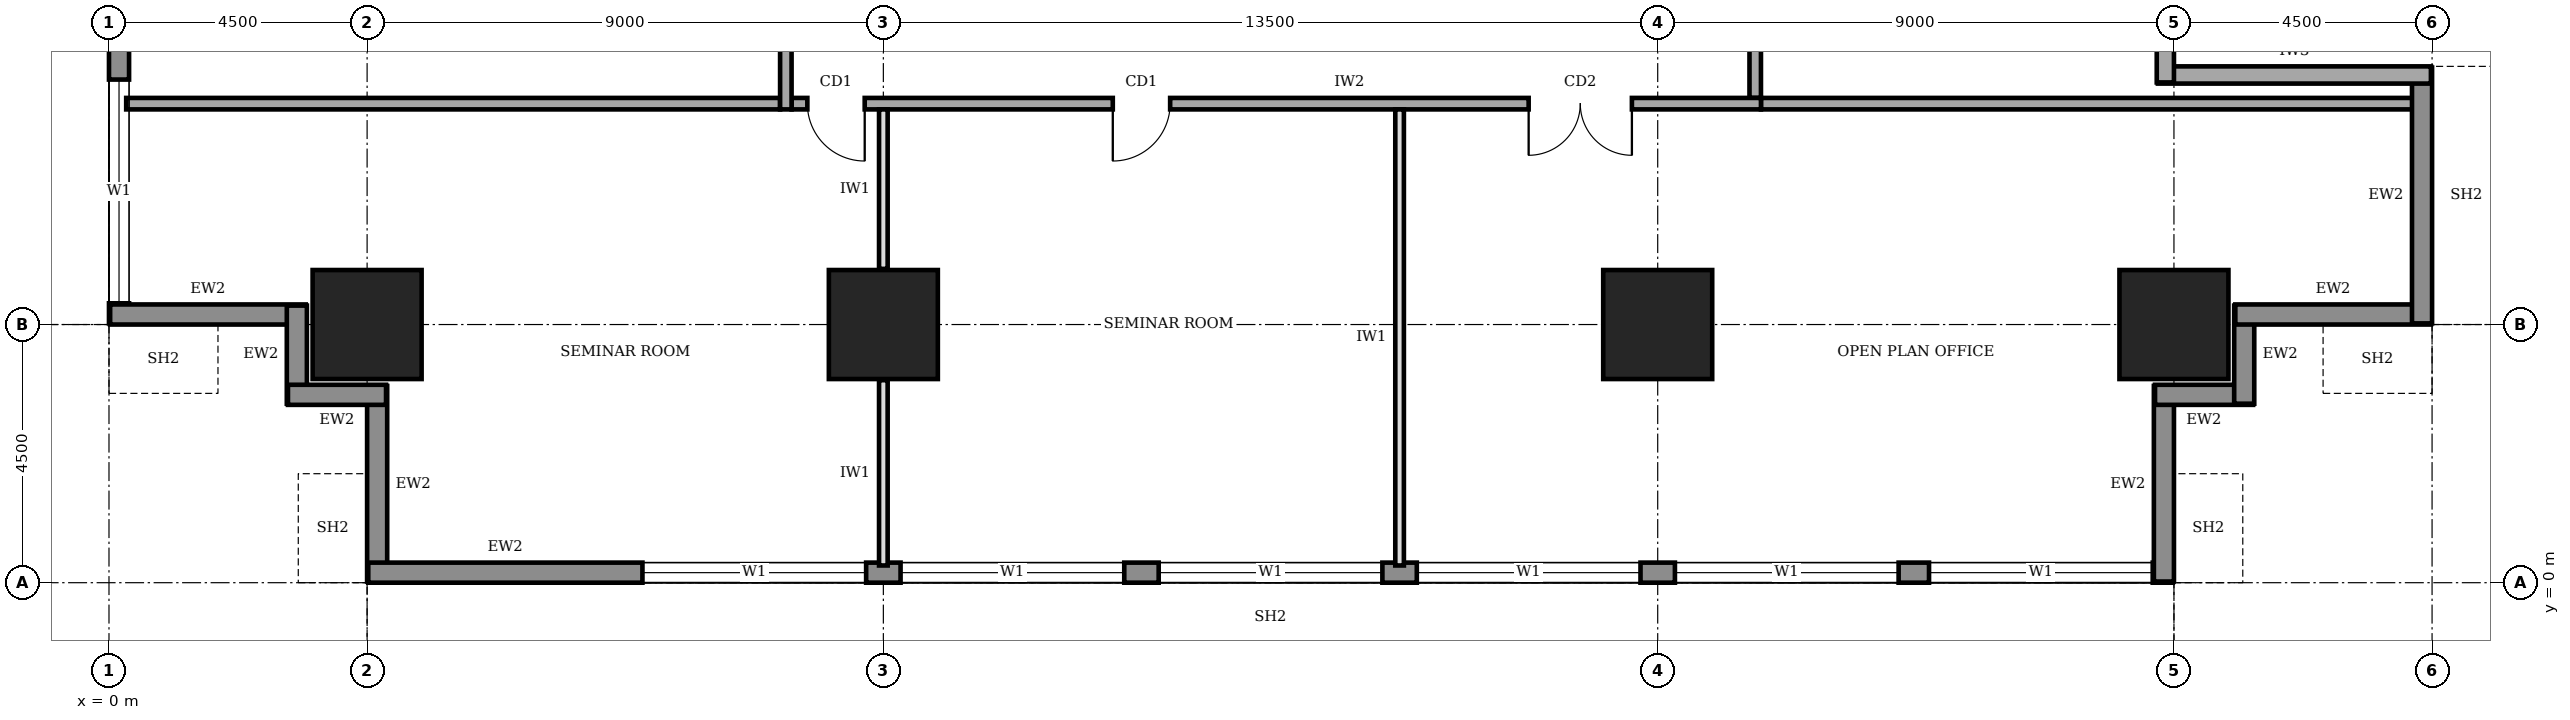
"""IFC4 building model, lengths in metres.
Left out: names, types, materials, properties, quantities, classifications, styles, units other than length and angle.
Written with IfcOpenShell. Run it as: python <this file> out.ifc"""

import sys

from ifc_helpers import new_model, si_unit, direction, frame, frame_2d, origin, origin_2d, place, context, subcontext, project, spatial, rectangle, extrude, element, fill, save


model = new_model("IFC4")
c1 = context("Model", 3, precision=1e-05, world=origin(), true_north=direction((0.0, 1.0)))
c2 = subcontext(c1, "Body", "Model", "MODEL_VIEW")
j1 = project(units=[si_unit("LENGTHUNIT", "METRE"), si_unit("PLANEANGLEUNIT", "RADIAN")], contexts=[c1])
p1 = place(None, origin())
s1 = spatial("IfcSite", under=j1, at=p1, CompositionType="ELEMENT")
p2 = place(p1, origin())
s2 = spatial("IfcBuilding", under=s1, at=p2, CompositionType="ELEMENT")
p3 = place(p2, frame((0.0, 0.0, 109.0)))
s3 = spatial("IfcBuildingStorey", under=s2, at=p3, CompositionType="ELEMENT", Elevation=109.0)
for number, where, z_axis, x_axis in (
    (1, (4.5, 4.5, 0.0), (0.0, 0.0, 1.0), (1.0, 0.0, 0.0)),
    (2, (13.5, 4.5, 0.0), (0.0, 0.0, 1.0), (1.0, 0.0, 0.0)),
    (3, (27.0, 4.5, 0.0), (0.0, 0.0, 1.0), (1.0, 0.0, 0.0)),
    (4, (36.0, 4.5, 0.0), (0.0, 0.0, 1.0), (1.0, 0.0, 0.0)),
):
    element("IfcColumn", number, at=place(p3, frame(where, z_axis=z_axis, x_axis=x_axis)), inside=s3, PredefinedType="COLUMN", context=c2, shape_type="SweptSolid", body=[
        extrude(rectangle(XDim=1.9, YDim=1.9, at=origin_2d()), origin(), (0.0, 0.0, 1.0), 4.0),
    ])
p4 = place(p3, frame((4.675, 3.43, 0.0), z_axis=(0.0, 0.0, 1.0), x_axis=(0.0, -1.0, 0.0)))
e5 = element("IfcWall", 5, at=p4, inside=s3, PredefinedType="STANDARD", context=c2, shape_type="SweptSolid", body=[
    extrude(rectangle(XDim=3.41, YDim=0.35, at=frame_2d((1.705, 0.0))), origin(), (0.0, 0.0, 1.0), 2.85),
])
p5 = place(p3, frame((4.52, 0.175, 0.0), z_axis=(0.0, 0.0, 1.0), x_axis=(1.0, 0.0, 0.0)))
e6 = element("IfcWall", 6, at=p5, inside=s3, PredefinedType="STANDARD", context=c2, shape_type="SweptSolid", body=[
    extrude(rectangle(XDim=31.46, YDim=0.35, at=frame_2d((15.73, 0.0))), origin(), (0.0, 0.0, 1.0), 3.75),
])
p6 = place(p5, frame((4.78, 0.0, 0.9)))
e7 = element("IfcOpeningElement", 7, at=p6, cuts=e6, PredefinedType="OPENING", context=c2, shape_type="SweptSolid", body=[
    extrude(rectangle(XDim=3.9, YDim=2.2, at=frame_2d((1.95, 1.1))), frame((0.0, 0.185, 0.0), z_axis=(0.0, -1.0, 0.0), x_axis=(1.0, 0.0, 0.0)), (0.0, 0.0, 1.0), 0.37),
])
p7 = place(p5, frame((9.28, 0.0, 0.9)))
e8 = element("IfcOpeningElement", 8, at=p7, cuts=e6, PredefinedType="OPENING", context=c2, shape_type="SweptSolid", body=[
    extrude(rectangle(XDim=3.9, YDim=2.2, at=frame_2d((1.95, 1.1))), frame((0.0, 0.185, 0.0), z_axis=(0.0, -1.0, 0.0), x_axis=(1.0, 0.0, 0.0)), (0.0, 0.0, 1.0), 0.37),
])
p8 = place(p5, frame((13.78, 0.0, 0.9)))
e9 = element("IfcOpeningElement", 9, at=p8, cuts=e6, PredefinedType="OPENING", context=c2, shape_type="SweptSolid", body=[
    extrude(rectangle(XDim=3.9, YDim=2.2, at=frame_2d((1.95, 1.1))), frame((0.0, 0.185, 0.0), z_axis=(0.0, -1.0, 0.0), x_axis=(1.0, 0.0, 0.0)), (0.0, 0.0, 1.0), 0.37),
])
p9 = place(p5, frame((18.28, 0.0, 0.9)))
e10 = element("IfcOpeningElement", 10, at=p9, cuts=e6, PredefinedType="OPENING", context=c2, shape_type="SweptSolid", body=[
    extrude(rectangle(XDim=3.9, YDim=2.2, at=frame_2d((1.95, 1.1))), frame((0.0, 0.185, 0.0), z_axis=(0.0, -1.0, 0.0), x_axis=(1.0, 0.0, 0.0)), (0.0, 0.0, 1.0), 0.37),
])
p10 = place(p5, frame((22.78, 0.0, 0.9)))
e11 = element("IfcOpeningElement", 11, at=p10, cuts=e6, PredefinedType="OPENING", context=c2, shape_type="SweptSolid", body=[
    extrude(rectangle(XDim=3.9, YDim=2.2, at=frame_2d((1.95, 1.1))), frame((0.0, 0.185, 0.0), z_axis=(0.0, -1.0, 0.0), x_axis=(1.0, 0.0, 0.0)), (0.0, 0.0, 1.0), 0.37),
])
p11 = place(p5, frame((27.21, 0.0, 0.9)))
e12 = element("IfcOpeningElement", 12, at=p11, cuts=e6, PredefinedType="OPENING", context=c2, shape_type="SweptSolid", body=[
    extrude(rectangle(XDim=3.9, YDim=2.2, at=frame_2d((1.95, 1.1))), frame((0.0, 0.185, 0.0), z_axis=(0.0, -1.0, 0.0), x_axis=(1.0, 0.0, 0.0)), (0.0, 0.0, 1.0), 0.37),
])
p12 = place(p3, frame((35.825, 0.02, 0.0), z_axis=(0.0, 0.0, 1.0), x_axis=(0.0, 1.0, 0.0)))
e13 = element("IfcWall", 13, at=p12, inside=s3, PredefinedType="STANDARD", context=c2, shape_type="SweptSolid", body=[
    extrude(rectangle(XDim=3.41, YDim=0.35, at=frame_2d((1.705, 0.0))), origin(), (0.0, 0.0, 1.0), 2.85),
])
for number, where, z_axis, x_axis in (
    (14, (35.67, 3.275, 0.0), (0.0, 0.0, 1.0), (1.0, 0.0, 0.0)),
    (15, (37.225, 3.12, 0.0), (0.0, 0.0, 1.0), (0.0, 1.0, 0.0)),
):
    element("IfcWall", number, at=place(p3, frame(where, z_axis=z_axis, x_axis=x_axis)), inside=s3, PredefinedType="STANDARD", context=c2, shape_type="SweptSolid", body=[
        extrude(rectangle(XDim=1.71, YDim=0.35, at=frame_2d((0.855, 0.0))), origin(), (0.0, 0.0, 1.0), 3.75),
    ])
p13 = place(p3, frame((37.07, 4.675, 0.0), z_axis=(0.0, 0.0, 1.0), x_axis=(1.0, 0.0, 0.0)))
e16 = element("IfcWall", 16, at=p13, inside=s3, PredefinedType="STANDARD", context=c2, shape_type="SweptSolid", body=[
    extrude(rectangle(XDim=3.41, YDim=0.35, at=frame_2d((1.705, 0.0))), origin(), (0.0, 0.0, 1.0), 2.85),
])
p14 = place(p3, frame((40.325, 4.52, 0.0), z_axis=(0.0, 0.0, 1.0), x_axis=(0.0, 1.0, 0.0)))
e17 = element("IfcWall", 17, at=p14, inside=s3, PredefinedType="STANDARD", context=c2, shape_type="SweptSolid", body=[
    extrude(rectangle(XDim=4.46, YDim=0.35, at=frame_2d((2.23, 0.0))), origin(), (0.0, 0.0, 1.0), 3.75),
])
p15 = place(p3, frame((40.48, 8.85, 0.0), z_axis=(0.0, 0.0, 1.0), x_axis=(-1.0, 0.0, 0.0)))
e18 = element("IfcWall", 18, at=p15, inside=s3, PredefinedType="SOLIDWALL", context=c2, shape_type="SweptSolid", body=[
    extrude(rectangle(XDim=4.76, YDim=0.3, at=frame_2d((2.38, 0.0))), origin(), (0.0, 0.0, 1.0), 3.75),
])
p16 = place(p3, frame((35.85, 8.72, 0.0), z_axis=(0.0, 0.0, 1.0), x_axis=(0.0, 1.0, 0.0)))
e19 = element("IfcWall", 19, at=p16, inside=s3, PredefinedType="SOLIDWALL", context=c2, shape_type="SweptSolid", body=[
    extrude(rectangle(XDim=1.38, YDim=0.3, at=frame_2d((0.69, 0.0))), origin(), (0.0, 0.0, 1.0), 2.65),
])
p17 = place(p3, frame((0.175, 35.98, 0.0), z_axis=(0.0, 0.0, 1.0), x_axis=(0.0, -1.0, 0.0)))
e20 = element("IfcWall", 20, at=p17, inside=s3, PredefinedType="STANDARD", context=c2, shape_type="SweptSolid", body=[
    extrude(rectangle(XDim=31.46, YDim=0.35, at=frame_2d((15.73, 0.0))), origin(), (0.0, 0.0, 1.0), 3.75),
])
p18 = place(p17, frame((27.21, 0.0, 0.9)))
e21 = element("IfcOpeningElement", 21, at=p18, cuts=e20, PredefinedType="OPENING", context=c2, shape_type="SweptSolid", body=[
    extrude(rectangle(XDim=3.9, YDim=2.2, at=frame_2d((1.95, 1.1))), frame((0.0, 0.185, 0.0), z_axis=(0.0, -1.0, 0.0), x_axis=(1.0, 0.0, 0.0)), (0.0, 0.0, 1.0), 0.37),
])
p19 = place(p17, frame((22.78, 0.0, 0.9)))
e22 = element("IfcOpeningElement", 22, at=p19, cuts=e20, PredefinedType="OPENING", context=c2, shape_type="SweptSolid", body=[
    extrude(rectangle(XDim=3.9, YDim=2.2, at=frame_2d((1.95, 1.1))), frame((0.0, 0.185, 0.0), z_axis=(0.0, -1.0, 0.0), x_axis=(1.0, 0.0, 0.0)), (0.0, 0.0, 1.0), 0.37),
])
p20 = place(p17, frame((18.28, 0.0, 0.9)))
e23 = element("IfcOpeningElement", 23, at=p20, cuts=e20, PredefinedType="OPENING", context=c2, shape_type="SweptSolid", body=[
    extrude(rectangle(XDim=3.9, YDim=2.2, at=frame_2d((1.95, 1.1))), frame((0.0, 0.185, 0.0), z_axis=(0.0, -1.0, 0.0), x_axis=(1.0, 0.0, 0.0)), (0.0, 0.0, 1.0), 0.37),
])
p21 = place(p17, frame((13.78, 0.0, 0.9)))
e24 = element("IfcOpeningElement", 24, at=p21, cuts=e20, PredefinedType="OPENING", context=c2, shape_type="SweptSolid", body=[
    extrude(rectangle(XDim=3.9, YDim=2.2, at=frame_2d((1.95, 1.1))), frame((0.0, 0.185, 0.0), z_axis=(0.0, -1.0, 0.0), x_axis=(1.0, 0.0, 0.0)), (0.0, 0.0, 1.0), 0.37),
])
p22 = place(p17, frame((9.28, 0.0, 0.9)))
e25 = element("IfcOpeningElement", 25, at=p22, cuts=e20, PredefinedType="OPENING", context=c2, shape_type="SweptSolid", body=[
    extrude(rectangle(XDim=3.9, YDim=2.2, at=frame_2d((1.95, 1.1))), frame((0.0, 0.185, 0.0), z_axis=(0.0, -1.0, 0.0), x_axis=(1.0, 0.0, 0.0)), (0.0, 0.0, 1.0), 0.37),
])
p23 = place(p17, frame((4.78, 0.0, 0.9)))
e26 = element("IfcOpeningElement", 26, at=p23, cuts=e20, PredefinedType="OPENING", context=c2, shape_type="SweptSolid", body=[
    extrude(rectangle(XDim=3.9, YDim=2.2, at=frame_2d((1.95, 1.1))), frame((0.0, 0.185, 0.0), z_axis=(0.0, -1.0, 0.0), x_axis=(1.0, 0.0, 0.0)), (0.0, 0.0, 1.0), 0.37),
])
p24 = place(p3, frame((0.02, 4.675, 0.0), z_axis=(0.0, 0.0, 1.0), x_axis=(1.0, 0.0, 0.0)))
e27 = element("IfcWall", 27, at=p24, inside=s3, PredefinedType="STANDARD", context=c2, shape_type="SweptSolid", body=[
    extrude(rectangle(XDim=3.41, YDim=0.35, at=frame_2d((1.705, 0.0))), origin(), (0.0, 0.0, 1.0), 2.85),
])
for number, where, z_axis, x_axis in (
    (28, (3.275, 4.83, 0.0), (0.0, 0.0, 1.0), (0.0, -1.0, 0.0)),
    (29, (3.12, 3.275, 0.0), (0.0, 0.0, 1.0), (1.0, 0.0, 0.0)),
):
    element("IfcWall", number, at=place(p3, frame(where, z_axis=z_axis, x_axis=x_axis)), inside=s3, PredefinedType="STANDARD", context=c2, shape_type="SweptSolid", body=[
        extrude(rectangle(XDim=1.71, YDim=0.35, at=frame_2d((0.855, 0.0))), origin(), (0.0, 0.0, 1.0), 3.75),
    ])
p25 = place(p3, frame((11.9, 8.35, 0.0), z_axis=(0.0, 0.0, 1.0), x_axis=(1.0, 0.0, 0.0)))
e30 = element("IfcWall", 30, at=p25, inside=s3, PredefinedType="SOLIDWALL", context=c2, shape_type="SweptSolid", body=[
    extrude(rectangle(XDim=16.9, YDim=0.2, at=frame_2d((8.45, 0.0))), origin(), (0.0, 0.0, 1.0), 3.75),
])
p26 = place(p25, frame((0.275, 0.0, 0.0)))
e31 = element("IfcOpeningElement", 31, at=p26, cuts=e30, PredefinedType="OPENING", context=c2, shape_type="SweptSolid", body=[
    extrude(rectangle(XDim=1.0, YDim=2.1, at=frame_2d((0.5, 1.05))), frame((0.0, 0.11, 0.0), z_axis=(0.0, -1.0, 0.0), x_axis=(1.0, 0.0, 0.0)), (0.0, 0.0, 1.0), 0.22),
])
p27 = place(p25, frame((5.6, 0.0, 0.0)))
e32 = element("IfcOpeningElement", 32, at=p27, cuts=e30, PredefinedType="OPENING", context=c2, shape_type="SweptSolid", body=[
    extrude(rectangle(XDim=1.0, YDim=2.1, at=frame_2d((0.5, 1.05))), frame((0.0, 0.11, 0.0), z_axis=(0.0, -1.0, 0.0), x_axis=(1.0, 0.0, 0.0)), (0.0, 0.0, 1.0), 0.22),
])
p28 = place(p25, frame((12.85, 0.0, 0.0)))
e33 = element("IfcOpeningElement", 33, at=p28, cuts=e30, PredefinedType="OPENING", context=c2, shape_type="SweptSolid", body=[
    extrude(rectangle(XDim=1.8, YDim=2.1, at=frame_2d((0.9, 1.05))), frame((0.0, 0.11, 0.0), z_axis=(0.0, -1.0, 0.0), x_axis=(1.0, 0.0, 0.0)), (0.0, 0.0, 1.0), 0.22),
])
p29 = place(p3, frame((28.7, 8.45, 0.0), z_axis=(0.0, 0.0, 1.0), x_axis=(0.0, 1.0, 0.0)))
e34 = element("IfcWall", 34, at=p29, inside=s3, PredefinedType="SOLIDWALL", context=c2, shape_type="SweptSolid", body=[
    extrude(rectangle(XDim=23.8, YDim=0.2, at=frame_2d((11.9, 0.0))), origin(), (0.0, 0.0, 1.0), 3.75),
])
p30 = place(p29, frame((10.9, 0.0, 0.0)))
e35 = element("IfcOpeningElement", 35, at=p30, cuts=e34, PredefinedType="OPENING", context=c2, shape_type="SweptSolid", body=[
    extrude(rectangle(XDim=1.8, YDim=2.1, at=frame_2d((0.9, 1.05))), frame((0.0, 0.11, 0.0), z_axis=(0.0, -1.0, 0.0), x_axis=(1.0, 0.0, 0.0)), (0.0, 0.0, 1.0), 0.22),
])
p31 = place(p3, frame((11.8, 32.05, 0.0), z_axis=(0.0, 0.0, 1.0), x_axis=(0.0, -1.0, 0.0)))
e36 = element("IfcWall", 36, at=p31, inside=s3, PredefinedType="SOLIDWALL", context=c2, shape_type="SweptSolid", body=[
    extrude(rectangle(XDim=23.8, YDim=0.2, at=frame_2d((11.9, 0.0))), origin(), (0.0, 0.0, 1.0), 3.75),
])
p32 = place(p31, frame((20.675, 0.0, 0.0)))
e37 = element("IfcOpeningElement", 37, at=p32, cuts=e36, PredefinedType="OPENING", context=c2, shape_type="SweptSolid", body=[
    extrude(rectangle(XDim=1.0, YDim=2.1, at=frame_2d((0.5, 1.05))), frame((0.0, 0.11, 0.0), z_axis=(0.0, -1.0, 0.0), x_axis=(1.0, 0.0, 0.0)), (0.0, 0.0, 1.0), 0.22),
])
p33 = place(p31, frame((16.9, 0.0, 0.0)))
e38 = element("IfcOpeningElement", 38, at=p33, cuts=e36, PredefinedType="OPENING", context=c2, shape_type="SweptSolid", body=[
    extrude(rectangle(XDim=0.9, YDim=2.1, at=frame_2d((0.45, 1.05))), frame((0.0, 0.11, 0.0), z_axis=(0.0, -1.0, 0.0), x_axis=(1.0, 0.0, 0.0)), (0.0, 0.0, 1.0), 0.22),
])
p34 = place(p31, frame((13.7, 0.0, 0.0)))
e39 = element("IfcOpeningElement", 39, at=p34, cuts=e36, PredefinedType="OPENING", context=c2, shape_type="SweptSolid", body=[
    extrude(rectangle(XDim=0.9, YDim=2.1, at=frame_2d((0.45, 1.05))), frame((0.0, 0.11, 0.0), z_axis=(0.0, -1.0, 0.0), x_axis=(1.0, 0.0, 0.0)), (0.0, 0.0, 1.0), 0.22),
])
p35 = place(p31, frame((8.15, 0.0, 0.0)))
e40 = element("IfcOpeningElement", 40, at=p35, cuts=e36, PredefinedType="OPENING", context=c2, shape_type="SweptSolid", body=[
    extrude(rectangle(XDim=0.9, YDim=2.1, at=frame_2d((0.45, 1.05))), frame((0.0, 0.11, 0.0), z_axis=(0.0, -1.0, 0.0), x_axis=(1.0, 0.0, 0.0)), (0.0, 0.0, 1.0), 0.22),
])
p36 = place(p31, frame((5.55, 0.0, 0.0)))
e41 = element("IfcOpeningElement", 41, at=p36, cuts=e36, PredefinedType="OPENING", context=c2, shape_type="SweptSolid", body=[
    extrude(rectangle(XDim=1.0, YDim=2.1, at=frame_2d((0.5, 1.05))), frame((0.0, 0.11, 0.0), z_axis=(0.0, -1.0, 0.0), x_axis=(1.0, 0.0, 0.0)), (0.0, 0.0, 1.0), 0.22),
])
p37 = place(p31, frame((10.65, 0.0, 0.0)))
e42 = element("IfcOpeningElement", 42, at=p37, cuts=e36, PredefinedType="OPENING", context=c2, shape_type="SweptSolid", body=[
    extrude(rectangle(XDim=1.0, YDim=2.1, at=frame_2d((0.5, 1.05))), frame((0.0, 0.11, 0.0), z_axis=(0.0, -1.0, 0.0), x_axis=(1.0, 0.0, 0.0)), (0.0, 0.0, 1.0), 0.22),
])
p38 = place(p31, frame((1.925, 0.0, 0.0)))
e43 = element("IfcOpeningElement", 43, at=p38, cuts=e36, PredefinedType="OPENING", context=c2, shape_type="SweptSolid", body=[
    extrude(rectangle(XDim=1.0, YDim=2.1, at=frame_2d((0.5, 1.05))), frame((0.0, 0.11, 0.0), z_axis=(0.0, -1.0, 0.0), x_axis=(1.0, 0.0, 0.0)), (0.0, 0.0, 1.0), 0.22),
])
for number, where, z_axis, x_axis in (
    (44, (0.3, 8.35, 0.0), (0.0, 0.0, 1.0), (1.0, 0.0, 0.0)),
    (45, (28.8, 8.35, 0.0), (0.0, 0.0, 1.0), (1.0, 0.0, 0.0)),
):
    element("IfcWall", number, at=place(p3, frame(where, z_axis=z_axis, x_axis=x_axis)), inside=s3, PredefinedType="SOLIDWALL", context=c2, shape_type="SweptSolid", body=[
        extrude(rectangle(XDim=11.4, YDim=0.2, at=frame_2d((5.7, 0.0))), origin(), (0.0, 0.0, 1.0), 3.75),
    ])
p39 = place(p3, frame((13.5, 0.3, 0.0), z_axis=(0.0, 0.0, 1.0), x_axis=(0.0, 1.0, 0.0)))
e46 = element("IfcWall", 46, at=p39, inside=s3, PredefinedType="PARTITIONING", context=c2, shape_type="SweptSolid", body=[
    extrude(rectangle(XDim=3.23, YDim=0.15, at=frame_2d((1.615, 0.0))), origin(), (0.0, 0.0, 1.0), 2.85),
])
p40 = place(p3, frame((13.5, 5.47, 0.0), z_axis=(0.0, 0.0, 1.0), x_axis=(0.0, 1.0, 0.0)))
e47 = element("IfcWall", 47, at=p40, inside=s3, PredefinedType="PARTITIONING", context=c2, shape_type="SweptSolid", body=[
    extrude(rectangle(XDim=2.78, YDim=0.15, at=frame_2d((1.39, 0.0))), origin(), (0.0, 0.0, 1.0), 2.85),
])
p41 = place(p3, frame((22.5, 0.3, 0.0), z_axis=(0.0, 0.0, 1.0), x_axis=(0.0, 1.0, 0.0)))
e48 = element("IfcWall", 48, at=p41, inside=s3, PredefinedType="PARTITIONING", context=c2, shape_type="SweptSolid", body=[
    extrude(rectangle(XDim=7.95, YDim=0.15, at=frame_2d((3.975, 0.0))), origin(), (0.0, 0.0, 1.0), 3.75),
])
p42 = place(p6, origin())
e49 = element("IfcWindow", 49, at=p42, inside=s3, PartitioningType="SINGLE_PANEL", PredefinedType="WINDOW", context=c2, shape_type="SweptSolid", body=[
    extrude(rectangle(XDim=3.9, YDim=2.2, at=frame_2d((1.95, 1.1))), frame((0.0, 0.03, 0.0), z_axis=(0.0, -1.0, 0.0), x_axis=(1.0, 0.0, 0.0)), (0.0, 0.0, 1.0), 0.06),
])
fill(e7, e49)
p43 = place(p7, origin())
e50 = element("IfcWindow", 50, at=p43, inside=s3, PartitioningType="SINGLE_PANEL", PredefinedType="WINDOW", context=c2, shape_type="SweptSolid", body=[
    extrude(rectangle(XDim=3.9, YDim=2.2, at=frame_2d((1.95, 1.1))), frame((0.0, 0.03, 0.0), z_axis=(0.0, -1.0, 0.0), x_axis=(1.0, 0.0, 0.0)), (0.0, 0.0, 1.0), 0.06),
])
fill(e8, e50)
p44 = place(p8, origin())
e51 = element("IfcWindow", 51, at=p44, inside=s3, PartitioningType="SINGLE_PANEL", PredefinedType="WINDOW", context=c2, shape_type="SweptSolid", body=[
    extrude(rectangle(XDim=3.9, YDim=2.2, at=frame_2d((1.95, 1.1))), frame((0.0, 0.03, 0.0), z_axis=(0.0, -1.0, 0.0), x_axis=(1.0, 0.0, 0.0)), (0.0, 0.0, 1.0), 0.06),
])
fill(e9, e51)
p45 = place(p9, origin())
e52 = element("IfcWindow", 52, at=p45, inside=s3, PartitioningType="SINGLE_PANEL", PredefinedType="WINDOW", context=c2, shape_type="SweptSolid", body=[
    extrude(rectangle(XDim=3.9, YDim=2.2, at=frame_2d((1.95, 1.1))), frame((0.0, 0.03, 0.0), z_axis=(0.0, -1.0, 0.0), x_axis=(1.0, 0.0, 0.0)), (0.0, 0.0, 1.0), 0.06),
])
fill(e10, e52)
p46 = place(p10, origin())
e53 = element("IfcWindow", 53, at=p46, inside=s3, PartitioningType="SINGLE_PANEL", PredefinedType="WINDOW", context=c2, shape_type="SweptSolid", body=[
    extrude(rectangle(XDim=3.9, YDim=2.2, at=frame_2d((1.95, 1.1))), frame((0.0, 0.03, 0.0), z_axis=(0.0, -1.0, 0.0), x_axis=(1.0, 0.0, 0.0)), (0.0, 0.0, 1.0), 0.06),
])
fill(e11, e53)
p47 = place(p11, origin())
e54 = element("IfcWindow", 54, at=p47, inside=s3, PartitioningType="SINGLE_PANEL", PredefinedType="WINDOW", context=c2, shape_type="SweptSolid", body=[
    extrude(rectangle(XDim=3.9, YDim=2.2, at=frame_2d((1.95, 1.1))), frame((0.0, 0.03, 0.0), z_axis=(0.0, -1.0, 0.0), x_axis=(1.0, 0.0, 0.0)), (0.0, 0.0, 1.0), 0.06),
])
fill(e12, e54)
p48 = place(p18, origin())
e55 = element("IfcWindow", 55, at=p48, inside=s3, PartitioningType="SINGLE_PANEL", PredefinedType="WINDOW", context=c2, shape_type="SweptSolid", body=[
    extrude(rectangle(XDim=3.9, YDim=2.2, at=frame_2d((1.95, 1.1))), frame((0.0, 0.03, 0.0), z_axis=(0.0, -1.0, 0.0), x_axis=(1.0, 0.0, 0.0)), (0.0, 0.0, 1.0), 0.06),
])
fill(e21, e55)
p49 = place(p26, frame((1.0, 0.0, 0.0), z_axis=(0.0, 0.0, 1.0), x_axis=(-1.0, 0.0, 0.0)))
e56 = element("IfcDoor", 56, at=p49, inside=s3, OperationType="SINGLE_SWING_LEFT", PredefinedType="DOOR", context=c2, shape_type="SweptSolid", body=[
    extrude(rectangle(XDim=1.0, YDim=2.1, at=frame_2d((0.5, 1.05))), frame((0.0, 0.025, 0.0), z_axis=(0.0, -1.0, 0.0), x_axis=(1.0, 0.0, 0.0)), (0.0, 0.0, 1.0), 0.05),
])
fill(e31, e56)
p50 = place(p27, frame((1.0, 0.0, 0.0), z_axis=(0.0, 0.0, 1.0), x_axis=(-1.0, 0.0, 0.0)))
e57 = element("IfcDoor", 57, at=p50, inside=s3, OperationType="SINGLE_SWING_RIGHT", PredefinedType="DOOR", context=c2, shape_type="SweptSolid", body=[
    extrude(rectangle(XDim=1.0, YDim=2.1, at=frame_2d((0.5, 1.05))), frame((0.0, 0.025, 0.0), z_axis=(0.0, -1.0, 0.0), x_axis=(1.0, 0.0, 0.0)), (0.0, 0.0, 1.0), 0.05),
])
fill(e32, e57)
p51 = place(p28, frame((1.8, 0.0, 0.0), z_axis=(0.0, 0.0, 1.0), x_axis=(-1.0, 0.0, 0.0)))
e58 = element("IfcDoor", 58, at=p51, inside=s3, OperationType="DOUBLE_DOOR_SINGLE_SWING", PredefinedType="DOOR", context=c2, shape_type="SweptSolid", body=[
    extrude(rectangle(XDim=1.8, YDim=2.1, at=frame_2d((0.9, 1.05))), frame((0.0, 0.025, 0.0), z_axis=(0.0, -1.0, 0.0), x_axis=(1.0, 0.0, 0.0)), (0.0, 0.0, 1.0), 0.05),
])
fill(e33, e58)
save(model, sys.argv[1])
